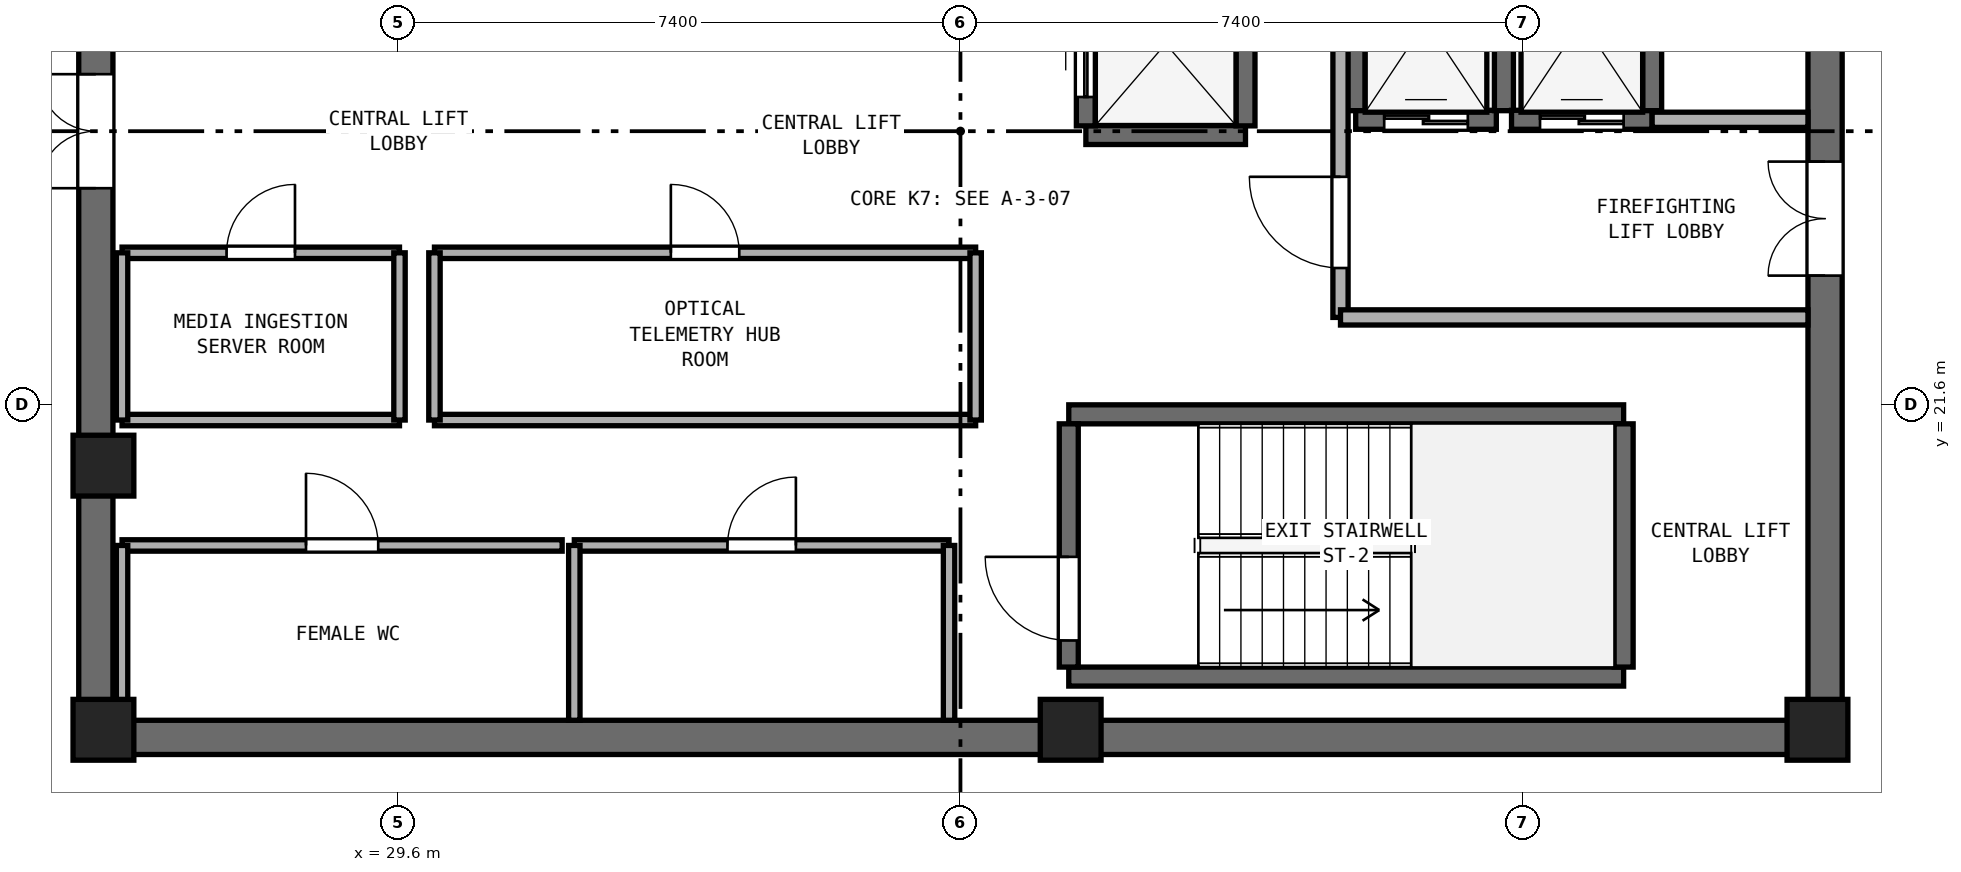
"""IFC4 building model, lengths in metres.
Left out: names, types, materials, properties, quantities, classifications, styles, units other than length and angle.
Written with IfcOpenShell. Run it as: python <this file> out.ifc"""

import sys

from ifc_helpers import new_model, si_unit, direction, frame, frame_2d, origin, origin_2d, place, context, subcontext, project, spatial, rectangle, extrude, element, fill, save


model = new_model("IFC4")
c1 = context("Model", 3, precision=1e-05, world=origin(), true_north=direction((0.0, 1.0)))
c2 = subcontext(c1, "Body", "Model", "MODEL_VIEW")
j1 = project(units=[si_unit("LENGTHUNIT", "METRE"), si_unit("PLANEANGLEUNIT", "RADIAN")], contexts=[c1])
p1 = place(None, origin())
s1 = spatial("IfcSite", under=j1, at=p1, CompositionType="ELEMENT")
p2 = place(p1, origin())
s2 = spatial("IfcBuilding", under=s1, at=p2, CompositionType="ELEMENT")
p3 = place(p2, frame((0.0, 0.0, 259.2)))
s3 = spatial("IfcBuildingStorey", under=s2, at=p3, CompositionType="ELEMENT", Elevation=259.2)
p4 = place(p3, frame((25.4, 17.225, 0.0), z_axis=(0.0, 0.0, 1.0), x_axis=(1.0, 0.0, 0.0)))
e1 = element("IfcWall", 1, at=p4, inside=s3, PredefinedType="SHEAR", context=c2, shape_type="SweptSolid", body=[
    extrude(rectangle(XDim=23.2, YDim=0.45, at=frame_2d((11.6, 0.0))), origin(), (0.0, 0.0, 1.0), 3.51),
])
p5 = place(p3, frame((25.625, 17.45, 0.0), z_axis=(0.0, 0.0, 1.0), x_axis=(0.0, 1.0, 0.0)))
e2 = element("IfcWall", 2, at=p5, inside=s3, PredefinedType="SHEAR", context=c2, shape_type="SweptSolid", body=[
    extrude(rectangle(XDim=15.5, YDim=0.45, at=frame_2d((7.75, 0.0))), origin(), (0.0, 0.0, 1.0), 3.51),
])
p6 = place(p5, frame((7.0, 0.0, 0.0)))
e3 = element("IfcOpeningElement", 3, at=p6, cuts=e2, PredefinedType="OPENING", context=c2, shape_type="SweptSolid", body=[
    extrude(rectangle(XDim=1.5, YDim=2.15, at=frame_2d((0.75, 1.075))), frame((0.0, 0.235, 0.0), z_axis=(0.0, -1.0, 0.0), x_axis=(1.0, 0.0, 0.0)), (0.0, 0.0, 1.0), 0.47),
])
p7 = place(p3, frame((48.375, 17.45, 0.0), z_axis=(0.0, 0.0, 1.0), x_axis=(0.0, 1.0, 0.0)))
e4 = element("IfcWall", 4, at=p7, inside=s3, PredefinedType="SHEAR", context=c2, shape_type="SweptSolid", body=[
    extrude(rectangle(XDim=15.5, YDim=0.45, at=frame_2d((7.75, 0.0))), origin(), (0.0, 0.0, 1.0), 3.51),
])
p8 = place(p7, frame((5.85, 0.0, 0.0)))
e5 = element("IfcOpeningElement", 5, at=p8, cuts=e4, PredefinedType="OPENING", context=c2, shape_type="SweptSolid", body=[
    extrude(rectangle(XDim=1.5, YDim=2.15, at=frame_2d((0.75, 1.075))), frame((0.0, 0.235, 0.0), z_axis=(0.0, -1.0, 0.0), x_axis=(1.0, 0.0, 0.0)), (0.0, 0.0, 1.0), 0.47),
])
for number, where, z_axis, x_axis in (
    (6, (25.725, 17.325, 0.0), (0.0, 0.0, 1.0), (1.0, 0.0, 0.0)),
    (7, (38.45, 17.325, 0.0), (0.0, 0.0, 1.0), (1.0, 0.0, 0.0)),
    (8, (48.275, 17.325, 0.0), (0.0, 0.0, 1.0), (1.0, 0.0, 0.0)),
    (9, (25.725, 20.8, 0.0), (0.0, 0.0, 1.0), (1.0, 0.0, 0.0)),
):
    element("IfcColumn", number, at=place(p3, frame(where, z_axis=z_axis, x_axis=x_axis)), inside=s3, PredefinedType="PILASTER", context=c2, shape_type="SweptSolid", body=[
        extrude(rectangle(XDim=0.8, YDim=0.8, at=origin_2d()), origin(), (0.0, 0.0, 1.0), 3.8),
    ])
for number, where, z_axis, x_axis in (
    (10, (38.425, 18.025, 0.0), (0.0, 0.0, 1.0), (1.0, 0.0, 0.0)),
    (11, (38.425, 21.475, 0.0), (0.0, 0.0, 1.0), (1.0, 0.0, 0.0)),
):
    element("IfcWall", number, at=place(p3, frame(where, z_axis=z_axis, x_axis=x_axis)), inside=s3, PredefinedType="SHEAR", context=c2, shape_type="SweptSolid", body=[
        extrude(rectangle(XDim=7.3, YDim=0.25, at=frame_2d((3.65, 0.0))), origin(), (0.0, 0.0, 1.0), 3.51),
    ])
p9 = place(p3, frame((38.425, 18.15, 0.0), z_axis=(0.0, 0.0, 1.0), x_axis=(0.0, 1.0, 0.0)))
e12 = element("IfcWall", 12, at=p9, inside=s3, PredefinedType="SHEAR", context=c2, shape_type="SweptSolid", body=[
    extrude(rectangle(XDim=3.2, YDim=0.25, at=frame_2d((1.6, 0.0))), origin(), (0.0, 0.0, 1.0), 3.51),
])
p10 = place(p9, frame((0.35, 0.0, 0.0)))
e13 = element("IfcOpeningElement", 13, at=p10, cuts=e12, PredefinedType="OPENING", context=c2, shape_type="SweptSolid", body=[
    extrude(rectangle(XDim=1.1, YDim=2.15, at=frame_2d((0.55, 1.075))), frame((0.0, 0.135, 0.0), z_axis=(0.0, -1.0, 0.0), x_axis=(1.0, 0.0, 0.0)), (0.0, 0.0, 1.0), 0.27),
])
p11 = place(p3, frame((45.725, 18.15, 0.0), z_axis=(0.0, 0.0, 1.0), x_axis=(0.0, 1.0, 0.0)))
e14 = element("IfcWall", 14, at=p11, inside=s3, PredefinedType="SHEAR", context=c2, shape_type="SweptSolid", body=[
    extrude(rectangle(XDim=3.2, YDim=0.25, at=frame_2d((1.6, 0.0))), origin(), (0.0, 0.0, 1.0), 3.51),
])
p12 = place(p3, frame((42.2, 25.35, 0.0), z_axis=(0.0, 0.0, 1.0), x_axis=(1.0, 0.0, 0.0)))
e15 = element("IfcWall", 15, at=p12, inside=s3, PredefinedType="SHEAR", context=c2, shape_type="SweptSolid", body=[
    extrude(rectangle(XDim=1.85, YDim=0.25, at=frame_2d((0.925, 0.0))), origin(), (0.0, 0.0, 1.0), 3.51),
])
p13 = place(p12, frame((0.375, 0.0, 0.0)))
e16 = element("IfcOpeningElement", 16, at=p13, cuts=e15, PredefinedType="OPENING", context=c2, shape_type="SweptSolid", body=[
    extrude(rectangle(XDim=1.1, YDim=2.15, at=frame_2d((0.55, 1.075))), frame((0.0, 0.135, 0.0), z_axis=(0.0, -1.0, 0.0), x_axis=(1.0, 0.0, 0.0)), (0.0, 0.0, 1.0), 0.27),
])
for number, where, z_axis, x_axis in (
    (17, (42.2, 25.47, 0.0), (0.0, 0.0, 1.0), (0.0, 1.0, 0.0)),
    (18, (44.15, 25.47, 0.0), (0.0, 0.0, 1.0), (0.0, 1.0, 0.0)),
):
    element("IfcWall", number, at=place(p3, frame(where, z_axis=z_axis, x_axis=x_axis)), inside=s3, PredefinedType="SHEAR", context=c2, shape_type="SweptSolid", body=[
        extrude(rectangle(XDim=2.36, YDim=0.25, at=frame_2d((1.18, 0.0))), origin(), (0.0, 0.0, 1.0), 3.51),
    ])
p14 = place(p3, frame((44.25, 25.35, 0.0), z_axis=(0.0, 0.0, 1.0), x_axis=(1.0, 0.0, 0.0)))
e19 = element("IfcWall", 19, at=p14, inside=s3, PredefinedType="SHEAR", context=c2, shape_type="SweptSolid", body=[
    extrude(rectangle(XDim=1.85, YDim=0.25, at=frame_2d((0.925, 0.0))), origin(), (0.0, 0.0, 1.0), 3.51),
])
p15 = place(p14, frame((0.375, 0.0, 0.0)))
e20 = element("IfcOpeningElement", 20, at=p15, cuts=e19, PredefinedType="OPENING", context=c2, shape_type="SweptSolid", body=[
    extrude(rectangle(XDim=1.1, YDim=2.15, at=frame_2d((0.55, 1.075))), frame((0.0, 0.135, 0.0), z_axis=(0.0, -1.0, 0.0), x_axis=(1.0, 0.0, 0.0)), (0.0, 0.0, 1.0), 0.27),
])
p16 = place(p3, frame((46.1, 25.47, 0.0), z_axis=(0.0, 0.0, 1.0), x_axis=(0.0, 1.0, 0.0)))
e21 = element("IfcWall", 21, at=p16, inside=s3, PredefinedType="SHEAR", context=c2, shape_type="SweptSolid", body=[
    extrude(rectangle(XDim=2.36, YDim=0.25, at=frame_2d((1.18, 0.0))), origin(), (0.0, 0.0, 1.0), 3.51),
])
p17 = place(p3, frame((38.65, 25.15, 0.0), z_axis=(0.0, 0.0, 1.0), x_axis=(1.0, 0.0, 0.0)))
e22 = element("IfcWall", 22, at=p17, inside=s3, PredefinedType="SHEAR", context=c2, shape_type="SweptSolid", body=[
    extrude(rectangle(XDim=2.1, YDim=0.25, at=frame_2d((1.05, 0.0))), origin(), (0.0, 0.0, 1.0), 3.51),
])
p18 = place(p3, frame((38.65, 25.27, 0.0), z_axis=(0.0, 0.0, 1.0), x_axis=(0.0, 1.0, 0.0)))
e23 = element("IfcWall", 23, at=p18, inside=s3, PredefinedType="SHEAR", context=c2, shape_type="SweptSolid", body=[
    extrude(rectangle(XDim=2.16, YDim=0.25, at=frame_2d((1.08, 0.0))), origin(), (0.0, 0.0, 1.0), 3.51),
])
p19 = place(p18, frame((0.38, 0.0, 0.0)))
e24 = element("IfcOpeningElement", 24, at=p19, cuts=e23, PredefinedType="OPENING", context=c2, shape_type="SweptSolid", body=[
    extrude(rectangle(XDim=1.4, YDim=2.2, at=frame_2d((0.7, 1.1))), frame((0.0, 0.135, 0.0), z_axis=(0.0, -1.0, 0.0), x_axis=(1.0, 0.0, 0.0)), (0.0, 0.0, 1.0), 0.27),
])
p20 = place(p3, frame((40.75, 25.27, 0.0), z_axis=(0.0, 0.0, 1.0), x_axis=(0.0, 1.0, 0.0)))
e25 = element("IfcWall", 25, at=p20, inside=s3, PredefinedType="SHEAR", context=c2, shape_type="SweptSolid", body=[
    extrude(rectangle(XDim=2.16, YDim=0.25, at=frame_2d((1.08, 0.0))), origin(), (0.0, 0.0, 1.0), 3.51),
])
p21 = place(p3, frame((42.0, 22.75, 0.0), z_axis=(0.0, 0.0, 1.0), x_axis=(0.0, 1.0, 0.0)))
e26 = element("IfcWall", 26, at=p21, inside=s3, PredefinedType="SOLIDWALL", context=c2, shape_type="SweptSolid", body=[
    extrude(rectangle(XDim=6.05, YDim=0.2, at=frame_2d((3.025, 0.0))), origin(), (0.0, 0.0, 1.0), 3.51),
])
p22 = place(p21, frame((0.65, 0.0, 0.0)))
e27 = element("IfcOpeningElement", 27, at=p22, cuts=e26, PredefinedType="OPENING", context=c2, shape_type="SweptSolid", body=[
    extrude(rectangle(XDim=1.2, YDim=2.15, at=frame_2d((0.6, 1.075))), frame((0.0, 0.11, 0.0), z_axis=(0.0, -1.0, 0.0), x_axis=(1.0, 0.0, 0.0)), (0.0, 0.0, 1.0), 0.22),
])
p23 = place(p3, frame((42.0, 22.75, 0.0), z_axis=(0.0, 0.0, 1.0), x_axis=(1.0, 0.0, 0.0)))
e28 = element("IfcWall", 28, at=p23, inside=s3, PredefinedType="SOLIDWALL", context=c2, shape_type="SweptSolid", body=[
    extrude(rectangle(XDim=6.15, YDim=0.2, at=frame_2d((3.075, 0.0))), origin(), (0.0, 0.0, 1.0), 3.51),
])
p24 = place(p3, frame((46.1, 25.35, 0.0), z_axis=(0.0, 0.0, 1.0), x_axis=(1.0, 0.0, 0.0)))
e29 = element("IfcWall", 29, at=p24, inside=s3, PredefinedType="SOLIDWALL", context=c2, shape_type="SweptSolid", body=[
    extrude(rectangle(XDim=2.05, YDim=0.2, at=frame_2d((1.025, 0.0))), origin(), (0.0, 0.0, 1.0), 3.51),
])
p25 = place(p3, frame((25.97, 19.75, 0.0), z_axis=(0.0, 0.0, 1.0), x_axis=(1.0, 0.0, 0.0)))
e30 = element("IfcWall", 30, at=p25, inside=s3, PredefinedType="PARTITIONING", context=c2, shape_type="SweptSolid", body=[
    extrude(rectangle(XDim=5.79, YDim=0.15, at=frame_2d((2.895, 0.0))), origin(), (0.0, 0.0, 1.0), 3.51),
])
p26 = place(p25, frame((2.42, 0.0, 0.0)))
e31 = element("IfcOpeningElement", 31, at=p26, cuts=e30, PredefinedType="OPENING", context=c2, shape_type="SweptSolid", body=[
    extrude(rectangle(XDim=0.95, YDim=2.1, at=frame_2d((0.475, 1.05))), frame((0.0, 0.085, 0.0), z_axis=(0.0, -1.0, 0.0), x_axis=(1.0, 0.0, 0.0)), (0.0, 0.0, 1.0), 0.17),
])
p27 = place(p3, frame((25.97, 17.45, 0.0), z_axis=(0.0, 0.0, 1.0), x_axis=(0.0, 1.0, 0.0)))
e32 = element("IfcWall", 32, at=p27, inside=s3, PredefinedType="PARTITIONING", context=c2, shape_type="SweptSolid", body=[
    extrude(rectangle(XDim=2.3, YDim=0.15, at=frame_2d((1.15, 0.0))), origin(), (0.0, 0.0, 1.0), 2.61),
])
p28 = place(p3, frame((31.92, 19.75, 0.0), z_axis=(0.0, 0.0, 1.0), x_axis=(1.0, 0.0, 0.0)))
e33 = element("IfcWall", 33, at=p28, inside=s3, PredefinedType="PARTITIONING", context=c2, shape_type="SweptSolid", body=[
    extrude(rectangle(XDim=4.93, YDim=0.15, at=frame_2d((2.465, 0.0))), origin(), (0.0, 0.0, 1.0), 3.51),
])
p29 = place(p28, frame((2.015, 0.0, 0.0)))
e34 = element("IfcOpeningElement", 34, at=p29, cuts=e33, PredefinedType="OPENING", context=c2, shape_type="SweptSolid", body=[
    extrude(rectangle(XDim=0.9, YDim=2.1, at=frame_2d((0.45, 1.05))), frame((0.0, 0.085, 0.0), z_axis=(0.0, -1.0, 0.0), x_axis=(1.0, 0.0, 0.0)), (0.0, 0.0, 1.0), 0.17),
])
for number, where, z_axis, x_axis in (
    (35, (31.92, 17.45, 0.0), (0.0, 0.0, 1.0), (0.0, 1.0, 0.0)),
    (36, (36.85, 17.45, 0.0), (0.0, 0.0, 1.0), (0.0, 1.0, 0.0)),
):
    element("IfcWall", number, at=place(p3, frame(where, z_axis=z_axis, x_axis=x_axis)), inside=s3, PredefinedType="PARTITIONING", context=c2, shape_type="SweptSolid", body=[
        extrude(rectangle(XDim=2.3, YDim=0.15, at=frame_2d((1.15, 0.0))), origin(), (0.0, 0.0, 1.0), 3.51),
    ])
p30 = place(p3, frame((25.97, 21.4, 0.0), z_axis=(0.0, 0.0, 1.0), x_axis=(1.0, 0.0, 0.0)))
e37 = element("IfcWall", 37, at=p30, inside=s3, PredefinedType="PARTITIONING", context=c2, shape_type="SweptSolid", body=[
    extrude(rectangle(XDim=3.65, YDim=0.15, at=frame_2d((1.825, 0.0))), origin(), (0.0, 0.0, 1.0), 3.51),
])
p31 = place(p3, frame((25.97, 23.6, 0.0), z_axis=(0.0, 0.0, 1.0), x_axis=(1.0, 0.0, 0.0)))
e38 = element("IfcWall", 38, at=p31, inside=s3, PredefinedType="PARTITIONING", context=c2, shape_type="SweptSolid", body=[
    extrude(rectangle(XDim=3.65, YDim=0.15, at=frame_2d((1.825, 0.0))), origin(), (0.0, 0.0, 1.0), 3.51),
])
p32 = place(p31, frame((1.375, 0.0, 0.0)))
e39 = element("IfcOpeningElement", 39, at=p32, cuts=e38, PredefinedType="OPENING", context=c2, shape_type="SweptSolid", body=[
    extrude(rectangle(XDim=0.9, YDim=2.1, at=frame_2d((0.45, 1.05))), frame((0.0, 0.085, 0.0), z_axis=(0.0, -1.0, 0.0), x_axis=(1.0, 0.0, 0.0)), (0.0, 0.0, 1.0), 0.17),
])
p33 = place(p3, frame((25.97, 21.4, 0.0), z_axis=(0.0, 0.0, 1.0), x_axis=(0.0, 1.0, 0.0)))
e40 = element("IfcWall", 40, at=p33, inside=s3, PredefinedType="PARTITIONING", context=c2, shape_type="SweptSolid", body=[
    extrude(rectangle(XDim=2.2, YDim=0.15, at=frame_2d((1.1, 0.0))), origin(), (0.0, 0.0, 1.0), 2.61),
])
p34 = place(p3, frame((29.62, 21.4, 0.0), z_axis=(0.0, 0.0, 1.0), x_axis=(0.0, 1.0, 0.0)))
e41 = element("IfcWall", 41, at=p34, inside=s3, PredefinedType="PARTITIONING", context=c2, shape_type="SweptSolid", body=[
    extrude(rectangle(XDim=2.2, YDim=0.15, at=frame_2d((1.1, 0.0))), origin(), (0.0, 0.0, 1.0), 3.51),
])
p35 = place(p3, frame((30.08, 21.4, 0.0), z_axis=(0.0, 0.0, 1.0), x_axis=(1.0, 0.0, 0.0)))
e42 = element("IfcWall", 42, at=p35, inside=s3, PredefinedType="PARTITIONING", context=c2, shape_type="SweptSolid", body=[
    extrude(rectangle(XDim=7.12, YDim=0.15, at=frame_2d((3.56, 0.0))), origin(), (0.0, 0.0, 1.0), 3.51),
])
p36 = place(p3, frame((30.08, 23.6, 0.0), z_axis=(0.0, 0.0, 1.0), x_axis=(1.0, 0.0, 0.0)))
e43 = element("IfcWall", 43, at=p36, inside=s3, PredefinedType="PARTITIONING", context=c2, shape_type="SweptSolid", body=[
    extrude(rectangle(XDim=7.12, YDim=0.15, at=frame_2d((3.56, 0.0))), origin(), (0.0, 0.0, 1.0), 3.51),
])
p37 = place(p36, frame((3.11, 0.0, 0.0)))
e44 = element("IfcOpeningElement", 44, at=p37, cuts=e43, PredefinedType="OPENING", context=c2, shape_type="SweptSolid", body=[
    extrude(rectangle(XDim=0.9, YDim=2.1, at=frame_2d((0.45, 1.05))), frame((0.0, 0.085, 0.0), z_axis=(0.0, -1.0, 0.0), x_axis=(1.0, 0.0, 0.0)), (0.0, 0.0, 1.0), 0.17),
])
for number, where, z_axis, x_axis in (
    (45, (30.08, 21.4, 0.0), (0.0, 0.0, 1.0), (0.0, 1.0, 0.0)),
    (46, (37.2, 21.4, 0.0), (0.0, 0.0, 1.0), (0.0, 1.0, 0.0)),
):
    element("IfcWall", number, at=place(p3, frame(where, z_axis=z_axis, x_axis=x_axis)), inside=s3, PredefinedType="PARTITIONING", context=c2, shape_type="SweptSolid", body=[
        extrude(rectangle(XDim=2.2, YDim=0.15, at=frame_2d((1.1, 0.0))), origin(), (0.0, 0.0, 1.0), 3.51),
    ])
p38 = place(p10, origin())
e47 = element("IfcDoor", 47, at=p38, inside=s3, OperationType="SINGLE_SWING_RIGHT", PredefinedType="DOOR", context=c2, shape_type="SweptSolid", body=[
    extrude(rectangle(XDim=1.1, YDim=2.15, at=frame_2d((0.55, 1.075))), frame((0.0, 0.025, 0.0), z_axis=(0.0, -1.0, 0.0), x_axis=(1.0, 0.0, 0.0)), (0.0, 0.0, 1.0), 0.05),
])
fill(e13, e47)
p39 = place(p13, origin())
e48 = element("IfcDoor", 48, at=p39, inside=s3, OperationType="DOUBLE_DOOR_SLIDING", PredefinedType="DOOR", context=c2, shape_type="SweptSolid", body=[
    extrude(rectangle(XDim=1.1, YDim=2.15, at=frame_2d((0.55, 1.075))), frame((0.0, 0.025, 0.0), z_axis=(0.0, -1.0, 0.0), x_axis=(1.0, 0.0, 0.0)), (0.0, 0.0, 1.0), 0.05),
])
fill(e16, e48)
p40 = place(p15, origin())
e49 = element("IfcDoor", 49, at=p40, inside=s3, OperationType="DOUBLE_DOOR_SLIDING", PredefinedType="DOOR", context=c2, shape_type="SweptSolid", body=[
    extrude(rectangle(XDim=1.1, YDim=2.15, at=frame_2d((0.55, 1.075))), frame((0.0, 0.025, 0.0), z_axis=(0.0, -1.0, 0.0), x_axis=(1.0, 0.0, 0.0)), (0.0, 0.0, 1.0), 0.05),
])
fill(e20, e49)
p41 = place(p19, origin())
e50 = element("IfcDoor", 50, at=p41, inside=s3, OperationType="DOUBLE_DOOR_SLIDING", PredefinedType="DOOR", context=c2, shape_type="SweptSolid", body=[
    extrude(rectangle(XDim=1.4, YDim=2.2, at=frame_2d((0.7, 1.1))), frame((0.0, 0.025, 0.0), z_axis=(0.0, -1.0, 0.0), x_axis=(1.0, 0.0, 0.0)), (0.0, 0.0, 1.0), 0.05),
])
fill(e24, e50)
p42 = place(p22, origin())
e51 = element("IfcDoor", 51, at=p42, inside=s3, OperationType="SINGLE_SWING_RIGHT", PredefinedType="DOOR", context=c2, shape_type="SweptSolid", body=[
    extrude(rectangle(XDim=1.2, YDim=2.15, at=frame_2d((0.6, 1.075))), frame((0.0, 0.025, 0.0), z_axis=(0.0, -1.0, 0.0), x_axis=(1.0, 0.0, 0.0)), (0.0, 0.0, 1.0), 0.05),
])
fill(e27, e51)
p43 = place(p6, origin())
e52 = element("IfcDoor", 52, at=p43, inside=s3, OperationType="DOUBLE_DOOR_SINGLE_SWING", PredefinedType="DOOR", context=c2, shape_type="SweptSolid", body=[
    extrude(rectangle(XDim=1.5, YDim=2.15, at=frame_2d((0.75, 1.075))), frame((0.0, 0.025, 0.0), z_axis=(0.0, -1.0, 0.0), x_axis=(1.0, 0.0, 0.0)), (0.0, 0.0, 1.0), 0.05),
])
fill(e3, e52)
p44 = place(p8, origin())
e53 = element("IfcDoor", 53, at=p44, inside=s3, OperationType="DOUBLE_DOOR_SINGLE_SWING", PredefinedType="DOOR", context=c2, shape_type="SweptSolid", body=[
    extrude(rectangle(XDim=1.5, YDim=2.15, at=frame_2d((0.75, 1.075))), frame((0.0, 0.025, 0.0), z_axis=(0.0, -1.0, 0.0), x_axis=(1.0, 0.0, 0.0)), (0.0, 0.0, 1.0), 0.05),
])
fill(e5, e53)
p45 = place(p26, origin())
e54 = element("IfcDoor", 54, at=p45, inside=s3, OperationType="SINGLE_SWING_LEFT", PredefinedType="DOOR", context=c2, shape_type="SweptSolid", body=[
    extrude(rectangle(XDim=0.95, YDim=2.1, at=frame_2d((0.475, 1.05))), frame((0.0, 0.025, 0.0), z_axis=(0.0, -1.0, 0.0), x_axis=(1.0, 0.0, 0.0)), (0.0, 0.0, 1.0), 0.05),
])
fill(e31, e54)
p46 = place(p29, origin())
e55 = element("IfcDoor", 55, at=p46, inside=s3, OperationType="SINGLE_SWING_RIGHT", PredefinedType="DOOR", context=c2, shape_type="SweptSolid", body=[
    extrude(rectangle(XDim=0.9, YDim=2.1, at=frame_2d((0.45, 1.05))), frame((0.0, 0.025, 0.0), z_axis=(0.0, -1.0, 0.0), x_axis=(1.0, 0.0, 0.0)), (0.0, 0.0, 1.0), 0.05),
])
fill(e34, e55)
p47 = place(p32, origin())
e56 = element("IfcDoor", 56, at=p47, inside=s3, OperationType="SINGLE_SWING_RIGHT", PredefinedType="DOOR", context=c2, shape_type="SweptSolid", body=[
    extrude(rectangle(XDim=0.9, YDim=2.1, at=frame_2d((0.45, 1.05))), frame((0.0, 0.025, 0.0), z_axis=(0.0, -1.0, 0.0), x_axis=(1.0, 0.0, 0.0)), (0.0, 0.0, 1.0), 0.05),
])
fill(e39, e56)
p48 = place(p37, origin())
e57 = element("IfcDoor", 57, at=p48, inside=s3, OperationType="SINGLE_SWING_LEFT", PredefinedType="DOOR", context=c2, shape_type="SweptSolid", body=[
    extrude(rectangle(XDim=0.9, YDim=2.1, at=frame_2d((0.45, 1.05))), frame((0.0, 0.025, 0.0), z_axis=(0.0, -1.0, 0.0), x_axis=(1.0, 0.0, 0.0)), (0.0, 0.0, 1.0), 0.05),
])
fill(e44, e57)
save(model, sys.argv[1])
